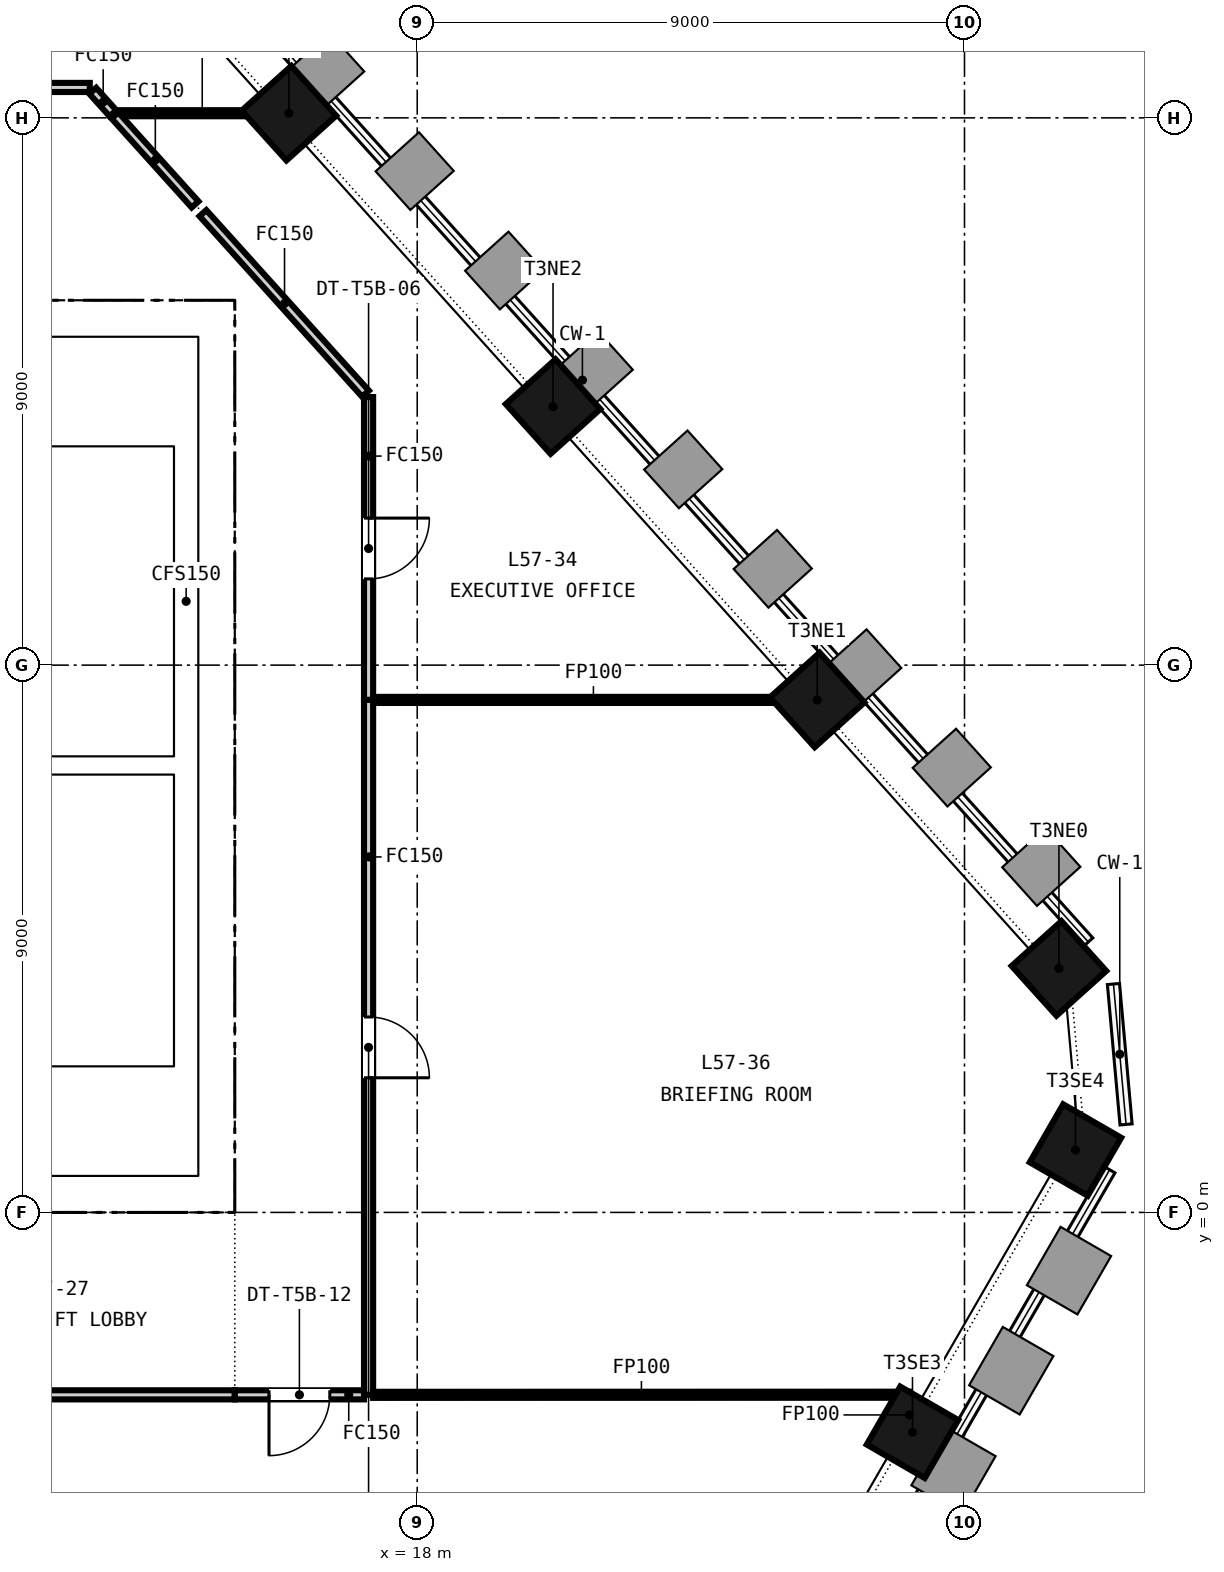
"""IFC4 building model, lengths in metres.
Left out: names, types, materials, properties, quantities, classifications, styles, units other than length and angle.
Written with IfcOpenShell. Run it as: python <this file> out.ifc"""

import sys

from ifc_helpers import new_model, si_unit, direction, frame, frame_2d, origin, origin_2d, place, context, subcontext, project, spatial, rectangle, extrude, element, fill, save


model = new_model("IFC4")
c1 = context("Model", 3, precision=1e-05, world=origin(), true_north=direction((0.0, 1.0)))
c2 = subcontext(c1, "Body", "Model", "MODEL_VIEW")
j1 = project(units=[si_unit("LENGTHUNIT", "METRE"), si_unit("PLANEANGLEUNIT", "RADIAN")], contexts=[c1])
p1 = place(None, origin())
s1 = spatial("IfcSite", under=j1, at=p1, CompositionType="ELEMENT")
p2 = place(p1, origin())
s2 = spatial("IfcBuilding", under=s1, at=p2, CompositionType="ELEMENT")
p3 = place(p2, frame((0.0, 0.0, 227.25)))
s3 = spatial("IfcBuildingStorey", under=s2, at=p3, CompositionType="ELEMENT", Elevation=227.25)
p4 = place(p3, frame((-15.0, 0.3, -0.15), z_axis=(0.0, 0.0, 1.0), x_axis=(1.0, 0.0, 0.0)))
e1 = element("IfcWall", 1, at=p4, inside=s3, PredefinedType="SOLIDWALL", context=c2, shape_type="SweptSolid", body=[
    extrude(rectangle(XDim=30.0, YDim=0.6, at=frame_2d((15.0, 0.0))), origin(), (0.0, 0.0, 1.0), 3.65),
])
p5 = place(p4, frame((5.8, 0.0, 0.15)))
e2 = element("IfcOpeningElement", 2, at=p5, cuts=e1, PredefinedType="OPENING", context=c2, shape_type="SweptSolid", body=[
    extrude(rectangle(XDim=2.4, YDim=2.4, at=frame_2d((1.2, 1.2))), frame((0.0, 0.31, 0.0), z_axis=(0.0, -1.0, 0.0), x_axis=(1.0, 0.0, 0.0)), (0.0, 0.0, 1.0), 0.62),
])
p6 = place(p4, frame((13.8, 0.0, 0.15)))
e3 = element("IfcOpeningElement", 3, at=p6, cuts=e1, PredefinedType="OPENING", context=c2, shape_type="SweptSolid", body=[
    extrude(rectangle(XDim=2.4, YDim=2.4, at=frame_2d((1.2, 1.2))), frame((0.0, 0.31, 0.0), z_axis=(0.0, -1.0, 0.0), x_axis=(1.0, 0.0, 0.0)), (0.0, 0.0, 1.0), 0.62),
])
p7 = place(p4, frame((21.8, 0.0, 0.15)))
e4 = element("IfcOpeningElement", 4, at=p7, cuts=e1, PredefinedType="OPENING", context=c2, shape_type="SweptSolid", body=[
    extrude(rectangle(XDim=2.4, YDim=2.4, at=frame_2d((1.2, 1.2))), frame((0.0, 0.31, 0.0), z_axis=(0.0, -1.0, 0.0), x_axis=(1.0, 0.0, 0.0)), (0.0, 0.0, 1.0), 0.62),
])
p8 = place(p4, frame((1.5, 0.0, 0.15)))
e5 = element("IfcOpeningElement", 5, at=p8, cuts=e1, PredefinedType="OPENING", context=c2, shape_type="SweptSolid", body=[
    extrude(rectangle(XDim=1.2, YDim=2.1, at=frame_2d((0.6, 1.05))), frame((0.0, 0.31, 0.0), z_axis=(0.0, -1.0, 0.0), x_axis=(1.0, 0.0, 0.0)), (0.0, 0.0, 1.0), 0.62),
])
p9 = place(p4, frame((27.3, 0.0, 0.15)))
e6 = element("IfcOpeningElement", 6, at=p9, cuts=e1, PredefinedType="OPENING", context=c2, shape_type="SweptSolid", body=[
    extrude(rectangle(XDim=1.2, YDim=2.1, at=frame_2d((0.6, 1.05))), frame((0.0, 0.31, 0.0), z_axis=(0.0, -1.0, 0.0), x_axis=(1.0, 0.0, 0.0)), (0.0, 0.0, 1.0), 0.62),
])
p10 = place(p3, frame((-15.0, 14.7, -0.15), z_axis=(0.0, 0.0, 1.0), x_axis=(1.0, 0.0, 0.0)))
e7 = element("IfcWall", 7, at=p10, inside=s3, PredefinedType="SOLIDWALL", context=c2, shape_type="SweptSolid", body=[
    extrude(rectangle(XDim=30.0, YDim=0.6, at=frame_2d((15.0, 0.0))), origin(), (0.0, 0.0, 1.0), 3.65),
])
p11 = place(p10, frame((9.25, 0.0, 0.15)))
e8 = element("IfcOpeningElement", 8, at=p11, cuts=e7, PredefinedType="OPENING", context=c2, shape_type="SweptSolid", body=[
    extrude(rectangle(XDim=1.5, YDim=2.1, at=frame_2d((0.75, 1.05))), frame((0.0, 0.31, 0.0), z_axis=(0.0, -1.0, 0.0), x_axis=(1.0, 0.0, 0.0)), (0.0, 0.0, 1.0), 0.62),
])
p12 = place(p10, frame((19.4, 0.0, 0.15)))
e9 = element("IfcOpeningElement", 9, at=p12, cuts=e7, PredefinedType="OPENING", context=c2, shape_type="SweptSolid", body=[
    extrude(rectangle(XDim=1.5, YDim=2.1, at=frame_2d((0.75, 1.05))), frame((0.0, 0.31, 0.0), z_axis=(0.0, -1.0, 0.0), x_axis=(1.0, 0.0, 0.0)), (0.0, 0.0, 1.0), 0.62),
])
p13 = place(p10, frame((1.5, 0.0, 0.15)))
e10 = element("IfcOpeningElement", 10, at=p13, cuts=e7, PredefinedType="OPENING", context=c2, shape_type="SweptSolid", body=[
    extrude(rectangle(XDim=1.2, YDim=2.1, at=frame_2d((0.6, 1.05))), frame((0.0, 0.31, 0.0), z_axis=(0.0, -1.0, 0.0), x_axis=(1.0, 0.0, 0.0)), (0.0, 0.0, 1.0), 0.62),
])
p14 = place(p10, frame((27.3, 0.0, 0.15)))
e11 = element("IfcOpeningElement", 11, at=p14, cuts=e7, PredefinedType="OPENING", context=c2, shape_type="SweptSolid", body=[
    extrude(rectangle(XDim=1.2, YDim=2.1, at=frame_2d((0.6, 1.05))), frame((0.0, 0.31, 0.0), z_axis=(0.0, -1.0, 0.0), x_axis=(1.0, 0.0, 0.0)), (0.0, 0.0, 1.0), 0.62),
])
p15 = place(p3, frame((14.7, 0.6, -0.15), z_axis=(0.0, 0.0, 1.0), x_axis=(0.0, 1.0, 0.0)))
e12 = element("IfcWall", 12, at=p15, inside=s3, PredefinedType="SOLIDWALL", context=c2, shape_type="SweptSolid", body=[
    extrude(rectangle(XDim=13.8, YDim=0.6, at=frame_2d((6.9, 0.0))), origin(), (0.0, 0.0, 1.0), 3.65),
])
for number, where, z_axis, x_axis in (
    (13, (26.145, -3.616, -0.15), (0.0, 0.0, 1.0), (0.5, 0.866, 0.0)),
    (14, (28.825, 1.026, -0.15), (0.0, 0.0, 1.0), (0.5, 0.866, 0.0)),
    (15, (28.553, 4.012, -0.15), (0.0, 0.0, 1.0), (-0.669, 0.743, 0.0)),
    (16, (24.577, 8.427, -0.15), (0.0, 0.0, 1.0), (-0.669, 0.743, 0.0)),
    (17, (20.233, 13.252, -0.15), (0.0, 0.0, 1.0), (-0.669, 0.743, 0.0)),
    (18, (15.89, 18.076, -0.15), (0.0, 0.0, 1.0), (-0.669, 0.743, 0.0)),
):
    element("IfcColumn", number, at=place(p3, frame(where, z_axis=z_axis, x_axis=x_axis)), inside=s3, PredefinedType="COLUMN", context=c2, shape_type="SweptSolid", body=[
        extrude(rectangle(XDim=1.1, YDim=1.1, at=origin_2d()), origin(), (0.0, 0.0, 1.0), 3.65),
    ])
p16 = place(p3, frame((11.05, 7.35, 0.0), z_axis=(0.0, 0.0, 1.0), x_axis=(1.0, 0.0, 0.0)))
e19 = element("IfcWall", 19, at=p16, inside=s3, PredefinedType="SOLIDWALL", context=c2, shape_type="SweptSolid", body=[
    extrude(rectangle(XDim=2.95, YDim=0.3, at=frame_2d((1.475, 0.0))), origin(), (0.0, 0.0, 1.0), 3.5),
])
p17 = place(p3, frame((14.2, 0.6, 0.0), z_axis=(0.0, 0.0, 1.0), x_axis=(0.0, 1.0, 0.0)))
e20 = element("IfcWall", 20, at=p17, inside=s3, PredefinedType="SOLIDWALL", context=c2, shape_type="SweptSolid", body=[
    extrude(rectangle(XDim=13.8, YDim=0.4, at=frame_2d((6.9, 0.0))), origin(), (0.0, 0.0, 1.0), 3.5),
])
p18 = place(p3, frame((15.0, -3.0, 0.0), z_axis=(0.0, 0.0, 1.0), x_axis=(-1.0, 0.0, 0.0)))
e21 = element("IfcWall", 21, at=p18, inside=s3, PredefinedType="PARTITIONING", context=c2, shape_type="SweptSolid", body=[
    extrude(rectangle(XDim=27.904, YDim=0.15, at=frame_2d((13.952, 0.0))), origin(), (0.0, 0.0, 1.0), 2.751),
])
p19 = place(p18, frame((13.052, 0.0, 0.0)))
e22 = element("IfcOpeningElement", 22, at=p19, cuts=e21, PredefinedType="OPENING", context=c2, shape_type="SweptSolid", body=[
    extrude(rectangle(XDim=1.8, YDim=2.1, at=frame_2d((0.9, 1.05))), frame((0.0, 0.085, 0.0), z_axis=(0.0, -1.0, 0.0), x_axis=(1.0, 0.0, 0.0)), (0.0, 0.0, 1.0), 0.17),
])
p20 = place(p3, frame((17.2, 13.408, 0.0), z_axis=(0.0, 0.0, 1.0), x_axis=(0.0, -1.0, 0.0)))
e23 = element("IfcWall", 23, at=p20, inside=s3, PredefinedType="PARTITIONING", context=c2, shape_type="SweptSolid", body=[
    extrude(rectangle(XDim=4.98, YDim=0.15, at=frame_2d((2.49, 0.0))), origin(), (0.0, 0.0, 1.0), 2.751),
])
p21 = place(p20, frame((1.99, 0.0, 0.0)))
e24 = element("IfcOpeningElement", 24, at=p21, cuts=e23, PredefinedType="OPENING", context=c2, shape_type="SweptSolid", body=[
    extrude(rectangle(XDim=1.0, YDim=2.1, at=frame_2d((0.5, 1.05))), frame((0.0, 0.085, 0.0), z_axis=(0.0, -1.0, 0.0), x_axis=(1.0, 0.0, 0.0)), (0.0, 0.0, 1.0), 0.17),
])
p22 = place(p3, frame((17.2, 8.428, 0.0), z_axis=(0.0, 0.0, 1.0), x_axis=(0.0, -1.0, 0.0)))
e25 = element("IfcWall", 25, at=p22, inside=s3, PredefinedType="PARTITIONING", context=c2, shape_type="SweptSolid", body=[
    extrude(rectangle(XDim=11.428, YDim=0.15, at=frame_2d((5.714, 0.0))), origin(), (0.0, 0.0, 1.0), 2.751),
])
p23 = place(p22, frame((5.214, 0.0, 0.0)))
e26 = element("IfcOpeningElement", 26, at=p23, cuts=e25, PredefinedType="OPENING", context=c2, shape_type="SweptSolid", body=[
    extrude(rectangle(XDim=1.0, YDim=2.1, at=frame_2d((0.5, 1.05))), frame((0.0, 0.085, 0.0), z_axis=(0.0, -1.0, 0.0), x_axis=(1.0, 0.0, 0.0)), (0.0, 0.0, 1.0), 0.17),
])
p24 = place(p3, frame((17.125, -3.0, 0.0), z_axis=(0.0, 0.0, 1.0), x_axis=(-1.0, 0.0, 0.0)))
e27 = element("IfcWall", 27, at=p24, inside=s3, PredefinedType="PARTITIONING", context=c2, shape_type="SweptSolid", body=[
    extrude(rectangle(XDim=2.125, YDim=0.15, at=frame_2d((1.062, 0.0))), origin(), (0.0, 0.0, 1.0), 2.751),
])
p25 = place(p24, frame((0.562, 0.0, 0.0)))
e28 = element("IfcOpeningElement", 28, at=p25, cuts=e27, PredefinedType="OPENING", context=c2, shape_type="SweptSolid", body=[
    extrude(rectangle(XDim=1.0, YDim=2.1, at=frame_2d((0.5, 1.05))), frame((0.0, 0.085, 0.0), z_axis=(0.0, -1.0, 0.0), x_axis=(1.0, 0.0, 0.0)), (0.0, 0.0, 1.0), 0.17),
])
p26 = place(p3, frame((1.931, 18.5, 0.0), z_axis=(0.0, 0.0, 1.0), x_axis=(1.0, 0.0, 0.0)))
e29 = element("IfcWall", 29, at=p26, inside=s3, PredefinedType="PARTITIONING", context=c2, shape_type="SweptSolid", body=[
    extrude(rectangle(XDim=10.684, YDim=0.15, at=frame_2d((5.342, 0.0))), origin(), (0.0, 0.0, 1.0), 2.751),
])
p27 = place(p26, frame((4.842, 0.0, 0.0)))
e30 = element("IfcOpeningElement", 30, at=p27, cuts=e29, PredefinedType="OPENING", context=c2, shape_type="SweptSolid", body=[
    extrude(rectangle(XDim=1.0, YDim=2.1, at=frame_2d((0.5, 1.05))), frame((0.0, 0.085, 0.0), z_axis=(0.0, -1.0, 0.0), x_axis=(1.0, 0.0, 0.0)), (0.0, 0.0, 1.0), 0.17),
])
p28 = place(p3, frame((12.665, 18.444, 0.0), z_axis=(0.0, 0.0, 1.0), x_axis=(0.668637752652, -0.743588297197, 0.0)))
e31 = element("IfcWall", 31, at=p28, inside=s3, PredefinedType="PARTITIONING", context=c2, shape_type="SweptSolid", body=[
    extrude(rectangle(XDim=0.495, YDim=0.15, at=frame_2d((0.248, 0.0))), origin(), (0.0, 0.0, 1.0), 2.751),
])
p29 = place(p3, frame((13.097, 18.076, 0.0), z_axis=(0.0, 0.0, 1.0), x_axis=(1.0, 0.0, 0.0)))
e32 = element("IfcWall", 32, at=p29, inside=s3, PredefinedType="PARTITIONING", context=c2, shape_type="SweptSolid", body=[
    extrude(rectangle(XDim=2.725, YDim=0.1, at=frame_2d((1.363, 0.0))), origin(), (0.0, 0.0, 1.0), 2.751),
])
p30 = place(p3, frame((13.03, 18.039, 0.0), z_axis=(0.0, 0.0, 1.0), x_axis=(0.669183955235, -0.743096786466, 0.0)))
e33 = element("IfcWall", 33, at=p30, inside=s3, PredefinedType="PARTITIONING", context=c2, shape_type="SweptSolid", body=[
    extrude(rectangle(XDim=1.969, YDim=0.15, at=frame_2d((0.984, 0.0))), origin(), (0.0, 0.0, 1.0), 2.751),
])
p31 = place(p3, frame((14.476, 16.433, 0.0), z_axis=(0.0, 0.0, 1.0), x_axis=(0.669204384193, -0.743078388985, 0.0)))
e34 = element("IfcWall", 34, at=p31, inside=s3, PredefinedType="PARTITIONING", context=c2, shape_type="SweptSolid", body=[
    extrude(rectangle(XDim=3.996, YDim=0.15, at=frame_2d((1.998, 0.0))), origin(), (0.0, 0.0, 1.0), 2.751),
])
p32 = place(p3, frame((17.275, 8.428, 0.0), z_axis=(0.0, 0.0, 1.0), x_axis=(1.0, 0.0, 0.0)))
e35 = element("IfcWall", 35, at=p32, inside=s3, PredefinedType="PARTITIONING", context=c2, shape_type="SweptSolid", body=[
    extrude(rectangle(XDim=7.235, YDim=0.1, at=frame_2d((3.618, 0.0))), origin(), (0.0, 0.0, 1.0), 2.751),
])
p33 = place(p3, frame((17.275, -3.0, 0.0), z_axis=(0.0, 0.0, 1.0), x_axis=(0.999999975449, 0.000221588228, 0.0)))
e36 = element("IfcWall", 36, at=p33, inside=s3, PredefinedType="PARTITIONING", context=c2, shape_type="SweptSolid", body=[
    extrude(rectangle(XDim=8.814, YDim=0.1, at=frame_2d((4.407, 0.0))), origin(), (0.0, 0.0, 1.0), 2.751),
])
p34 = place(p3, frame((26.089, -3.613, 0.0), z_axis=(0.0, 0.0, 1.0), x_axis=(0.0, 1.0, 0.0)))
e37 = element("IfcWall", 37, at=p34, inside=s3, PredefinedType="PARTITIONING", context=c2, shape_type="SweptSolid", body=[
    extrude(rectangle(XDim=0.565, YDim=0.1, at=frame_2d((0.282, 0.0))), origin(), (0.0, 0.0, 1.0), 2.751),
])
p35 = place(p14, origin())
e38 = element("IfcDoor", 38, at=p35, inside=s3, OperationType="SINGLE_SWING_LEFT", PredefinedType="DOOR", context=c2, shape_type="SweptSolid", body=[
    extrude(rectangle(XDim=1.2, YDim=2.1, at=frame_2d((0.6, 1.05))), frame((0.0, 0.025, 0.0), z_axis=(0.0, -1.0, 0.0), x_axis=(1.0, 0.0, 0.0)), (0.0, 0.0, 1.0), 0.05),
])
fill(e11, e38)
p36 = place(p9, origin())
e39 = element("IfcDoor", 39, at=p36, inside=s3, OperationType="SINGLE_SWING_RIGHT", PredefinedType="DOOR", context=c2, shape_type="SweptSolid", body=[
    extrude(rectangle(XDim=1.2, YDim=2.1, at=frame_2d((0.6, 1.05))), frame((0.0, 0.025, 0.0), z_axis=(0.0, -1.0, 0.0), x_axis=(1.0, 0.0, 0.0)), (0.0, 0.0, 1.0), 0.05),
])
fill(e6, e39)
p37 = place(p21, origin())
e40 = element("IfcDoor", 40, at=p37, inside=s3, OperationType="SINGLE_SWING_LEFT", PredefinedType="DOOR", context=c2, shape_type="SweptSolid", body=[
    extrude(rectangle(XDim=1.0, YDim=2.1, at=frame_2d((0.5, 1.05))), frame((0.0, 0.025, 0.0), z_axis=(0.0, -1.0, 0.0), x_axis=(1.0, 0.0, 0.0)), (0.0, 0.0, 1.0), 0.05),
])
fill(e24, e40)
p38 = place(p23, origin())
e41 = element("IfcDoor", 41, at=p38, inside=s3, OperationType="SINGLE_SWING_RIGHT", PredefinedType="DOOR", context=c2, shape_type="SweptSolid", body=[
    extrude(rectangle(XDim=1.0, YDim=2.1, at=frame_2d((0.5, 1.05))), frame((0.0, 0.025, 0.0), z_axis=(0.0, -1.0, 0.0), x_axis=(1.0, 0.0, 0.0)), (0.0, 0.0, 1.0), 0.05),
])
fill(e26, e41)
p39 = place(p25, origin())
e42 = element("IfcDoor", 42, at=p39, inside=s3, OperationType="SINGLE_SWING_RIGHT", PredefinedType="DOOR", context=c2, shape_type="SweptSolid", body=[
    extrude(rectangle(XDim=1.0, YDim=2.1, at=frame_2d((0.5, 1.05))), frame((0.0, 0.025, 0.0), z_axis=(0.0, -1.0, 0.0), x_axis=(1.0, 0.0, 0.0)), (0.0, 0.0, 1.0), 0.05),
])
fill(e28, e42)
save(model, sys.argv[1])
